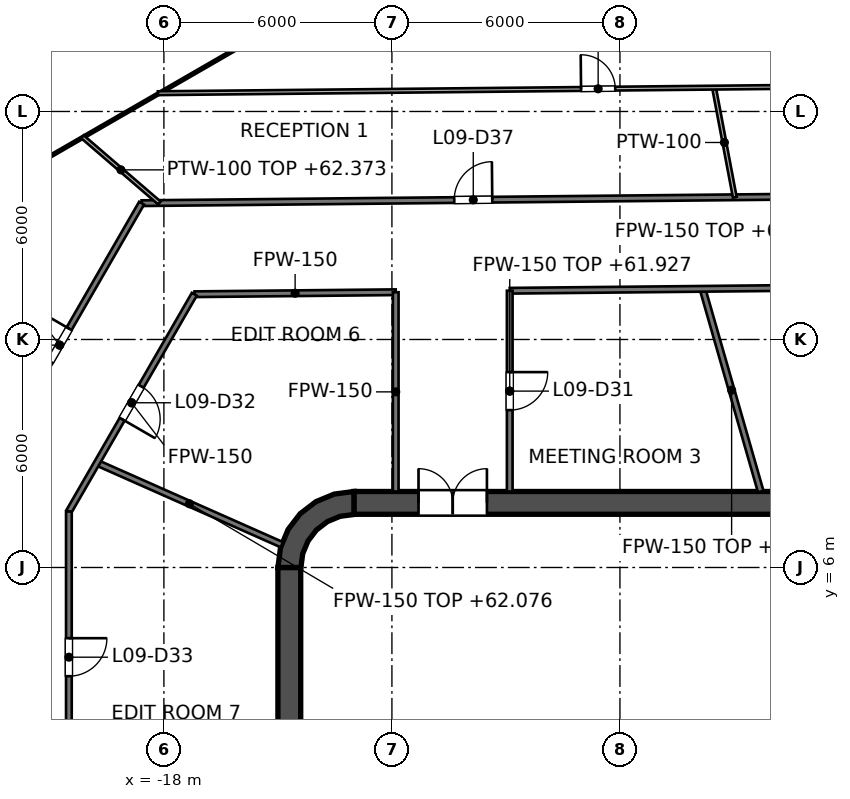
"""IFC4 building model, lengths in metres.
Left out: names, types, materials, properties, quantities, classifications, styles, units other than length and angle.
Written with IfcOpenShell. Run it as: python <this file> out.ifc"""

import sys

from ifc_helpers import new_model, si_unit, direction, frame, frame_2d, origin, place, context, subcontext, project, spatial, polyline, rectangle, outline, extrude, element, fill, save


model = new_model("IFC4")
c1 = context("Model", 3, precision=1e-05, world=origin(), true_north=direction((0.0, 1.0)))
c2 = subcontext(c1, "Body", "Model", "MODEL_VIEW")
j1 = project(units=[si_unit("LENGTHUNIT", "METRE"), si_unit("PLANEANGLEUNIT", "RADIAN")], contexts=[c1])
p1 = place(None, origin())
s1 = spatial("IfcSite", under=j1, at=p1, CompositionType="ELEMENT")
p2 = place(p1, origin())
s2 = spatial("IfcBuilding", under=s1, at=p2, CompositionType="ELEMENT")
p3 = place(p2, frame((0.0, 0.0, 58.8)))
s3 = spatial("IfcBuildingStorey", under=s2, at=p3, CompositionType="ELEMENT", Elevation=58.8)
p4 = place(p3, frame((-13.0, 7.7, 0.0), z_axis=(0.0, 0.0, 1.0), x_axis=(1.0, 0.0, 0.0)))
e1 = element("IfcWall", 1, at=p4, inside=s3, PredefinedType="SHEAR", context=c2, shape_type="SweptSolid", body=[
    extrude(rectangle(XDim=26.0, YDim=0.6, at=frame_2d((13.0, 0.0))), origin(), (0.0, 0.0, 1.0), 4.2),
])
p5 = place(p4, frame((1.7, 0.0, 0.0)))
e2 = element("IfcOpeningElement", 2, at=p5, cuts=e1, PredefinedType="OPENING", context=c2, shape_type="SweptSolid", body=[
    extrude(rectangle(XDim=1.8, YDim=2.1, at=frame_2d((0.9, 1.05))), frame((0.0, 0.3, 0.0), z_axis=(0.0, -1.0, 0.0), x_axis=(1.0, 0.0, 0.0)), (0.0, 0.0, 1.0), 0.6),
])
p6 = place(p4, frame((22.5, 0.0, 0.0)))
e3 = element("IfcOpeningElement", 3, at=p6, cuts=e1, PredefinedType="OPENING", context=c2, shape_type="SweptSolid", body=[
    extrude(rectangle(XDim=1.8, YDim=2.1, at=frame_2d((0.9, 1.05))), frame((0.0, 0.3, 0.0), z_axis=(0.0, -1.0, 0.0), x_axis=(1.0, 0.0, 0.0)), (0.0, 0.0, 1.0), 0.6),
])
p7 = place(p3, frame((-14.7, -6.0, 0.0), z_axis=(0.0, 0.0, 1.0), x_axis=(0.0, 1.0, 0.0)))
e4 = element("IfcWall", 4, at=p7, inside=s3, PredefinedType="SHEAR", context=c2, shape_type="SweptSolid", body=[
    extrude(rectangle(XDim=12.0, YDim=0.6, at=frame_2d((6.0, 0.0))), origin(), (0.0, 0.0, 1.0), 4.2),
])
p8 = place(p3, origin())
e5 = element("IfcWall", 5, at=p8, inside=s3, PredefinedType="SHEAR", context=c2, shape_type="SweptSolid", body=[
    extrude(outline(polyline([(-15.0, 6.0), (-14.395, 6.0), (-14.347, 6.361), (-14.208, 6.698), (-13.986, 6.986), (-13.698, 7.208), (-13.361, 7.347), (-13.0, 7.395), (-13.0, 8.0), (-13.518, 7.932), (-14.0, 7.732), (-14.414, 7.414), (-14.732, 7.0), (-14.932, 6.518), (-15.0, 6.0)])), origin(), (0.0, 0.0, 1.0), 4.2),
])
p9 = place(p3, frame((-9.0, 4.1, 0.0), z_axis=(0.0, 0.0, 1.0), x_axis=(0.0, 1.0, 0.0)))
e6 = element("IfcWall", 6, at=p9, inside=s3, PredefinedType="SOLIDWALL", context=c2, shape_type="SweptSolid", body=[
    extrude(rectangle(XDim=2.5, YDim=0.25, at=frame_2d((1.25, 0.0))), origin(), (0.0, 0.0, 1.0), 4.05),
])
p10 = place(p9, frame((0.65, 0.0, 0.0)))
e7 = element("IfcOpeningElement", 7, at=p10, cuts=e6, PredefinedType="OPENING", context=c2, shape_type="SweptSolid", body=[
    extrude(rectangle(XDim=1.2, YDim=2.1, at=frame_2d((0.6, 1.05))), frame((0.0, 0.125, 0.0), z_axis=(0.0, -1.0, 0.0), x_axis=(1.0, 0.0, 0.0)), (0.0, 0.0, 1.0), 0.25),
])
p11 = place(p3, frame((-3.15, 4.1, 0.0), z_axis=(0.0, 0.0, 1.0), x_axis=(0.0, 1.0, 0.0)))
e8 = element("IfcWall", 8, at=p11, inside=s3, PredefinedType="SOLIDWALL", context=c2, shape_type="SweptSolid", body=[
    extrude(rectangle(XDim=2.5, YDim=0.25, at=frame_2d((1.25, 0.0))), origin(), (0.0, 0.0, 1.0), 4.05),
])
p12 = place(p3, frame((-9.125, 7.0, 0.0), z_axis=(0.0, 0.0, 1.0), x_axis=(1.0, 0.0, 0.0)))
e9 = element("IfcWall", 9, at=p12, inside=s3, PredefinedType="SOLIDWALL", context=c2, shape_type="SweptSolid", body=[
    extrude(rectangle(XDim=18.25, YDim=0.8, at=frame_2d((9.125, 0.0))), origin(), (0.0, 0.0, 1.0), 4.05),
])
p13 = place(p3, frame((-9.125, 3.975, 0.0), z_axis=(0.0, 0.0, 1.0), x_axis=(1.0, 0.0, 0.0)))
e10 = element("IfcWall", 10, at=p13, inside=s3, PredefinedType="SOLIDWALL", context=c2, shape_type="SweptSolid", body=[
    extrude(rectangle(XDim=8.35, YDim=0.25, at=frame_2d((4.175, 0.0))), origin(), (0.0, 0.0, 1.0), 4.05),
])
p14 = place(p3, frame((-9.0, 1.65, 0.0), z_axis=(0.0, 0.0, 1.0), x_axis=(0.0, 1.0, 0.0)))
e11 = element("IfcWall", 11, at=p14, inside=s3, PredefinedType="PARTITIONING", context=c2, shape_type="SweptSolid", body=[
    extrude(rectangle(XDim=2.2, YDim=0.25, at=frame_2d((1.1, 0.0))), origin(), (0.0, 0.0, 1.0), 4.05),
])
for number, where, z_axis, x_axis in (
    (12, (-7.0, 1.65, 0.0), (0.0, 0.0, 1.0), (0.0, 1.0, 0.0)),
    (13, (-2.8, 1.65, 0.0), (0.0, 0.0, 1.0), (0.0, 1.0, 0.0)),
):
    element("IfcWall", number, at=place(p3, frame(where, z_axis=z_axis, x_axis=x_axis)), inside=s3, PredefinedType="PARTITIONING", context=c2, shape_type="SweptSolid", body=[
        extrude(rectangle(XDim=2.2, YDim=0.1, at=frame_2d((1.1, 0.0))), origin(), (0.0, 0.0, 1.0), 4.05),
    ])
p15 = place(p3, frame((-11.8, -7.4, 0.0), z_axis=(0.0, 0.0, 1.0), x_axis=(0.0, 1.0, 0.0)))
e14 = element("IfcWall", 14, at=p15, inside=s3, PredefinedType="SOLIDWALL", context=c2, shape_type="SweptSolid", body=[
    extrude(rectangle(XDim=14.8, YDim=0.4, at=frame_2d((7.4, 0.0))), origin(), (0.0, 0.0, 1.0), 4.05),
])
p16 = place(p15, frame((11.2, 0.0, 0.0)))
e15 = element("IfcOpeningElement", 15, at=p16, cuts=e14, PredefinedType="OPENING", context=c2, shape_type="SweptSolid", body=[
    extrude(rectangle(XDim=1.1, YDim=2.1, at=frame_2d((0.55, 1.05))), frame((0.0, 0.2, 0.0), z_axis=(0.0, -1.0, 0.0), x_axis=(1.0, 0.0, 0.0)), (0.0, 0.0, 1.0), 0.4),
])
p17 = place(p15, frame((8.3, 0.0, 0.0)))
e16 = element("IfcOpeningElement", 16, at=p17, cuts=e14, PredefinedType="OPENING", context=c2, shape_type="SweptSolid", body=[
    extrude(rectangle(XDim=1.1, YDim=2.1, at=frame_2d((0.55, 1.05))), frame((0.0, 0.2, 0.0), z_axis=(0.0, -1.0, 0.0), x_axis=(1.0, 0.0, 0.0)), (0.0, 0.0, 1.0), 0.4),
])
p18 = place(p15, frame((5.4, 0.0, 0.0)))
e17 = element("IfcOpeningElement", 17, at=p18, cuts=e14, PredefinedType="OPENING", context=c2, shape_type="SweptSolid", body=[
    extrude(rectangle(XDim=1.1, YDim=2.1, at=frame_2d((0.55, 1.05))), frame((0.0, 0.2, 0.0), z_axis=(0.0, -1.0, 0.0), x_axis=(1.0, 0.0, 0.0)), (0.0, 0.0, 1.0), 0.4),
])
p19 = place(p15, frame((13.552, 0.0, 0.0)))
e18 = element("IfcOpeningElement", 18, at=p19, cuts=e14, PredefinedType="OPENING", context=c2, shape_type="SweptSolid", body=[
    extrude(rectangle(XDim=0.9, YDim=2.1, at=frame_2d((0.45, 1.05))), frame((0.0, 0.2, 0.0), z_axis=(0.0, -1.0, 0.0), x_axis=(1.0, 0.0, 0.0)), (0.0, 0.0, 1.0), 0.4),
])
p20 = place(p15, frame((0.347, 0.0, 0.0)))
e19 = element("IfcOpeningElement", 19, at=p20, cuts=e14, PredefinedType="OPENING", context=c2, shape_type="SweptSolid", body=[
    extrude(rectangle(XDim=0.9, YDim=2.1, at=frame_2d((0.45, 1.05))), frame((0.0, 0.2, 0.0), z_axis=(0.0, -1.0, 0.0), x_axis=(1.0, 0.0, 0.0)), (0.0, 0.0, 1.0), 0.4),
])
e20 = element("IfcWall", 20, at=p8, inside=s3, PredefinedType="SOLIDWALL", context=c2, shape_type="SweptSolid", body=[
    extrude(outline(polyline([(-12.0, -5.925), (-12.0, -5.675), (-14.15, -5.675), (-14.15, -3.025), (-12.0, -3.025), (-12.0, -2.775), (-14.15, -2.775), (-14.15, -0.125), (-12.0, -0.125), (-12.0, 0.125), (-14.15, 0.125), (-14.15, 2.775), (-12.0, 2.775), (-12.0, 3.025), (-14.15, 3.025), (-14.15, 5.675), (-12.0, 5.675), (-12.0, 5.925), (-14.15, 5.925), (-14.4, 5.925), (-14.4, 5.675), (-14.4, 3.025), (-14.4, 2.775), (-14.4, 0.125), (-14.4, -0.125), (-14.4, -2.775), (-14.4, -3.025), (-14.4, -5.675), (-14.4, -5.925), (-14.15, -5.925), (-12.0, -5.925)])), origin(), (0.0, 0.0, 1.0), 4.05),
])
p21 = place(p3, frame((-3.827, 13.333, 0.0), z_axis=(0.0, 0.0, 1.0), x_axis=(0.275935525478, -0.961176147113, 0.0)))
e21 = element("IfcWall", 21, at=p21, inside=s3, PredefinedType="PARTITIONING", context=c2, shape_type="SweptSolid", body=[
    extrude(rectangle(XDim=5.548, YDim=0.15, at=frame_2d((2.774, 0.0))), origin(), (0.0, 0.0, 1.0), 4.05),
])
p22 = place(p3, frame((-19.76, 8.755, 0.0), z_axis=(0.0, 0.0, 1.0), x_axis=(0.91424834547, -0.405154245695, 0.0)))
e22 = element("IfcWall", 22, at=p22, inside=s3, PredefinedType="PARTITIONING", context=c2, shape_type="SweptSolid", body=[
    extrude(rectangle(XDim=5.318, YDim=0.15, at=frame_2d((2.659, 0.0))), origin(), (0.0, 0.0, 1.0), 3.276),
])
p23 = place(p3, frame((-17.194, 13.191, 0.0), z_axis=(0.0, 0.0, 1.0), x_axis=(0.999950394899, 0.009960308291, 0.0)))
e23 = element("IfcWall", 23, at=p23, inside=s3, PredefinedType="PARTITIONING", context=c2, shape_type="SweptSolid", body=[
    extrude(rectangle(XDim=5.294, YDim=0.15, at=frame_2d((2.647, 0.0))), origin(), (0.0, 0.0, 1.0), 3.195),
])
p24 = place(p3, frame((-8.9, 13.282, 0.0), z_axis=(0.0, 0.0, 1.0), x_axis=(0.999950697987, 0.009929833562, 0.0)))
e24 = element("IfcWall", 24, at=p24, inside=s3, PredefinedType="PARTITIONING", context=c2, shape_type="SweptSolid", body=[
    extrude(rectangle(XDim=17.801, YDim=0.15, at=frame_2d((8.9, 0.0))), origin(), (0.0, 0.0, 1.0), 3.127),
])
p25 = place(p24, frame((8.412, 0.0, 0.0)))
e25 = element("IfcOpeningElement", 25, at=p25, cuts=e24, PredefinedType="OPENING", context=c2, shape_type="SweptSolid", body=[
    extrude(rectangle(XDim=1.0, YDim=2.1, at=frame_2d((0.5, 1.05))), frame((0.0, 0.075, 0.0), z_axis=(0.0, -1.0, 0.0), x_axis=(1.0, 0.0, 0.0)), (0.0, 0.0, 1.0), 0.15),
])
p26 = place(p3, frame((-18.587, 15.587, 0.0), z_axis=(0.0, 0.0, 1.0), x_axis=(0.99995065417, 0.009934245078, 0.0)))
e26 = element("IfcWall", 26, at=p26, inside=s3, PredefinedType="PARTITIONING", context=c2, shape_type="SweptSolid", body=[
    extrude(rectangle(XDim=33.669, YDim=0.15, at=frame_2d((16.834, 0.0))), origin(), (0.0, 0.0, 1.0), 3.127),
])
p27 = place(p26, frame((18.716, 0.0, 0.0)))
e27 = element("IfcOpeningElement", 27, at=p27, cuts=e26, PredefinedType="OPENING", context=c2, shape_type="SweptSolid", body=[
    extrude(rectangle(XDim=1.0, YDim=2.1, at=frame_2d((0.5, 1.05))), frame((0.0, 0.075, 0.0), z_axis=(0.0, -1.0, 0.0), x_axis=(1.0, 0.0, 0.0)), (0.0, 0.0, 1.0), 0.15),
])
p28 = place(p26, frame((8.228, 0.0, 0.0)))
e28 = element("IfcOpeningElement", 28, at=p28, cuts=e26, PredefinedType="OPENING", context=c2, shape_type="SweptSolid", body=[
    extrude(rectangle(XDim=1.0, YDim=2.1, at=frame_2d((0.5, 1.05))), frame((0.0, 0.075, 0.0), z_axis=(0.0, -1.0, 0.0), x_axis=(1.0, 0.0, 0.0)), (0.0, 0.0, 1.0), 0.15),
])
p29 = place(p26, frame((29.768, 0.0, 0.0)))
e29 = element("IfcOpeningElement", 29, at=p29, cuts=e26, PredefinedType="OPENING", context=c2, shape_type="SweptSolid", body=[
    extrude(rectangle(XDim=1.0, YDim=2.1, at=frame_2d((0.5, 1.05))), frame((0.0, 0.075, 0.0), z_axis=(0.0, -1.0, 0.0), x_axis=(1.0, 0.0, 0.0)), (0.0, 0.0, 1.0), 0.15),
])
p30 = place(p26, frame((24.449, 0.0, 0.0)))
e30 = element("IfcOpeningElement", 30, at=p30, cuts=e26, PredefinedType="OPENING", context=c2, shape_type="SweptSolid", body=[
    extrude(rectangle(XDim=1.0, YDim=2.1, at=frame_2d((0.5, 1.05))), frame((0.0, 0.075, 0.0), z_axis=(0.0, -1.0, 0.0), x_axis=(1.0, 0.0, 0.0)), (0.0, 0.0, 1.0), 0.15),
])
p31 = place(p3, frame((-20.5, 7.474, 0.0), z_axis=(0.0, 0.0, 1.0), x_axis=(0.500012665616, 0.866018091164, 0.0)))
e31 = element("IfcWall", 31, at=p31, inside=s3, PredefinedType="PARTITIONING", context=c2, shape_type="SweptSolid", body=[
    extrude(rectangle(XDim=6.602, YDim=0.15, at=frame_2d((3.301, 0.0))), origin(), (0.0, 0.0, 1.0), 3.195),
])
p32 = place(p31, frame((2.803, 0.0, 0.0)))
e32 = element("IfcOpeningElement", 32, at=p32, cuts=e31, PredefinedType="OPENING", context=c2, shape_type="SweptSolid", body=[
    extrude(rectangle(XDim=1.0, YDim=2.1, at=frame_2d((0.5, 1.05))), frame((0.0, 0.075, 0.0), z_axis=(0.0, -1.0, 0.0), x_axis=(1.0, 0.0, 0.0)), (0.0, 0.0, 1.0), 0.15),
])
p33 = place(p3, frame((-22.9, 8.117, 0.0), z_axis=(0.0, 0.0, 1.0), x_axis=(0.500017275495, 0.866015429543, 0.0)))
e33 = element("IfcWall", 33, at=p33, inside=s3, PredefinedType="PARTITIONING", context=c2, shape_type="SweptSolid", body=[
    extrude(rectangle(XDim=8.626, YDim=0.15, at=frame_2d((4.313, 0.0))), origin(), (0.0, 0.0, 1.0), 3.195),
])
p34 = place(p33, frame((3.813, 0.0, 0.0)))
e34 = element("IfcOpeningElement", 34, at=p34, cuts=e33, PredefinedType="OPENING", context=c2, shape_type="SweptSolid", body=[
    extrude(rectangle(XDim=1.0, YDim=2.1, at=frame_2d((0.5, 1.05))), frame((0.0, 0.075, 0.0), z_axis=(0.0, -1.0, 0.0), x_axis=(1.0, 0.0, 0.0)), (0.0, 0.0, 1.0), 0.15),
])
p35 = place(p3, frame((-8.9, 8.0, 0.0), z_axis=(0.0, 0.0, 1.0), x_axis=(0.0, 1.0, 0.0)))
e35 = element("IfcWall", 35, at=p35, inside=s3, PredefinedType="PARTITIONING", context=c2, shape_type="SweptSolid", body=[
    extrude(rectangle(XDim=5.283, YDim=0.15, at=frame_2d((2.642, 0.0))), origin(), (0.0, 0.0, 1.0), 3.127),
])
p36 = place(p35, frame((2.142, 0.0, 0.0)))
e36 = element("IfcOpeningElement", 36, at=p36, cuts=e35, PredefinedType="OPENING", context=c2, shape_type="SweptSolid", body=[
    extrude(rectangle(XDim=1.0, YDim=2.1, at=frame_2d((0.5, 1.05))), frame((0.0, 0.075, 0.0), z_axis=(0.0, -1.0, 0.0), x_axis=(1.0, 0.0, 0.0)), (0.0, 0.0, 1.0), 0.15),
])
p37 = place(p3, frame((-11.9, 8.0, 0.0), z_axis=(0.0, 0.0, 1.0), x_axis=(0.0, 1.0, 0.0)))
e37 = element("IfcWall", 37, at=p37, inside=s3, PredefinedType="PARTITIONING", context=c2, shape_type="SweptSolid", body=[
    extrude(rectangle(XDim=5.243, YDim=0.15, at=frame_2d((2.622, 0.0))), origin(), (0.0, 0.0, 1.0), 3.195),
])
p38 = place(p3, frame((-20.5, -7.095, 0.0), z_axis=(0.0, 0.0, 1.0), x_axis=(0.0, 1.0, 0.0)))
e38 = element("IfcWall", 38, at=p38, inside=s3, PredefinedType="PARTITIONING", context=c2, shape_type="SweptSolid", body=[
    extrude(rectangle(XDim=14.569, YDim=0.15, at=frame_2d((7.285, 0.0))), origin(), (0.0, 0.0, 1.0), 3.127),
])
p39 = place(p38, frame((10.234, 0.0, 0.0)))
e39 = element("IfcOpeningElement", 39, at=p39, cuts=e38, PredefinedType="OPENING", context=c2, shape_type="SweptSolid", body=[
    extrude(rectangle(XDim=1.0, YDim=2.1, at=frame_2d((0.5, 1.05))), frame((0.0, 0.075, 0.0), z_axis=(0.0, -1.0, 0.0), x_axis=(1.0, 0.0, 0.0)), (0.0, 0.0, 1.0), 0.15),
])
p40 = place(p38, frame((3.0, 0.0, 0.0)))
e40 = element("IfcOpeningElement", 40, at=p40, cuts=e38, PredefinedType="OPENING", context=c2, shape_type="SweptSolid", body=[
    extrude(rectangle(XDim=1.0, YDim=2.1, at=frame_2d((0.5, 1.05))), frame((0.0, 0.075, 0.0), z_axis=(0.0, -1.0, 0.0), x_axis=(1.0, 0.0, 0.0)), (0.0, 0.0, 1.0), 0.15),
])
p41 = place(p3, frame((-3.524, 18.626, 0.0), z_axis=(0.0, 0.0, 1.0), x_axis=(0.185980649988, -0.982553407113, 0.0)))
e41 = element("IfcWall", 41, at=p41, inside=s3, PredefinedType="PARTITIONING", context=c2, shape_type="SweptSolid", body=[
    extrude(rectangle(XDim=2.935, YDim=0.1, at=frame_2d((1.468, 0.0))), origin(), (0.0, 0.0, 1.0), 4.05),
])
p42 = place(p3, frame((-20.143, 17.335, 0.0), z_axis=(0.0, 0.0, 1.0), x_axis=(0.757945732802, -0.652317611389, 0.0)))
e42 = element("IfcWall", 42, at=p42, inside=s3, PredefinedType="PARTITIONING", context=c2, shape_type="SweptSolid", body=[
    extrude(rectangle(XDim=2.672, YDim=0.1, at=frame_2d((1.336, 0.0))), origin(), (0.0, 0.0, 1.0), 3.573),
])
p43 = place(p3, frame((-18.158, 18.481, 0.0), z_axis=(0.0, 0.0, 1.0), x_axis=(0.999950046819, 0.009995192196, 0.0)))
e43 = element("IfcWall", 43, at=p43, inside=s3, PredefinedType="PARTITIONING", context=c2, shape_type="SweptSolid", body=[
    extrude(rectangle(XDim=34.001, YDim=0.1, at=frame_2d((17.0, 0.0))), origin(), (0.0, 0.0, 1.0), 3.127),
])
p44 = place(p43, frame((11.135, 0.0, 0.0)))
e44 = element("IfcOpeningElement", 44, at=p44, cuts=e43, PredefinedType="OPENING", context=c2, shape_type="SweptSolid", body=[
    extrude(rectangle(XDim=0.9, YDim=2.1, at=frame_2d((0.45, 1.05))), frame((0.0, 0.05, 0.0), z_axis=(0.0, -1.0, 0.0), x_axis=(1.0, 0.0, 0.0)), (0.0, 0.0, 1.0), 0.1),
])
p45 = place(p43, frame((28.875, 0.0, 0.0)))
e45 = element("IfcOpeningElement", 45, at=p45, cuts=e43, PredefinedType="OPENING", context=c2, shape_type="SweptSolid", body=[
    extrude(rectangle(XDim=0.9, YDim=2.1, at=frame_2d((0.45, 1.05))), frame((0.0, 0.05, 0.0), z_axis=(0.0, -1.0, 0.0), x_axis=(1.0, 0.0, 0.0)), (0.0, 0.0, 1.0), 0.1),
])
p46 = place(p16, origin())
e46 = element("IfcDoor", 46, at=p46, inside=s3, OperationType="DOUBLE_DOOR_SLIDING", PredefinedType="DOOR", context=c2, shape_type="SweptSolid", body=[
    extrude(rectangle(XDim=1.1, YDim=2.1, at=frame_2d((0.55, 1.05))), frame((0.0, 0.025, 0.0), z_axis=(0.0, -1.0, 0.0), x_axis=(1.0, 0.0, 0.0)), (0.0, 0.0, 1.0), 0.05),
])
fill(e15, e46)
p47 = place(p10, origin())
e47 = element("IfcDoor", 47, at=p47, inside=s3, OperationType="SINGLE_SWING_RIGHT", PredefinedType="DOOR", context=c2, shape_type="SweptSolid", body=[
    extrude(rectangle(XDim=1.2, YDim=2.1, at=frame_2d((0.6, 1.05))), frame((0.0, 0.025, 0.0), z_axis=(0.0, -1.0, 0.0), x_axis=(1.0, 0.0, 0.0)), (0.0, 0.0, 1.0), 0.05),
])
fill(e7, e47)
p48 = place(p19, origin())
e48 = element("IfcDoor", 48, at=p48, inside=s3, OperationType="SINGLE_SWING_LEFT", PredefinedType="DOOR", context=c2, shape_type="SweptSolid", body=[
    extrude(rectangle(XDim=0.9, YDim=2.1, at=frame_2d((0.45, 1.05))), frame((0.0, 0.025, 0.0), z_axis=(0.0, -1.0, 0.0), x_axis=(1.0, 0.0, 0.0)), (0.0, 0.0, 1.0), 0.05),
])
fill(e18, e48)
p49 = place(p5, origin())
e49 = element("IfcDoor", 49, at=p49, inside=s3, OperationType="DOUBLE_DOOR_SINGLE_SWING", PredefinedType="DOOR", context=c2, shape_type="SweptSolid", body=[
    extrude(rectangle(XDim=1.8, YDim=2.1, at=frame_2d((0.9, 1.05))), frame((0.0, 0.025, 0.0), z_axis=(0.0, -1.0, 0.0), x_axis=(1.0, 0.0, 0.0)), (0.0, 0.0, 1.0), 0.05),
])
fill(e2, e49)
p50 = place(p36, origin())
e50 = element("IfcDoor", 50, at=p50, inside=s3, OperationType="SINGLE_SWING_RIGHT", PredefinedType="DOOR", context=c2, shape_type="SweptSolid", body=[
    extrude(rectangle(XDim=1.0, YDim=2.1, at=frame_2d((0.5, 1.05))), frame((0.0, 0.025, 0.0), z_axis=(0.0, -1.0, 0.0), x_axis=(1.0, 0.0, 0.0)), (0.0, 0.0, 1.0), 0.05),
])
fill(e36, e50)
p51 = place(p32, origin())
e51 = element("IfcDoor", 51, at=p51, inside=s3, OperationType="SINGLE_SWING_LEFT", PredefinedType="DOOR", context=c2, shape_type="SweptSolid", body=[
    extrude(rectangle(XDim=1.0, YDim=2.1, at=frame_2d((0.5, 1.05))), frame((0.0, 0.025, 0.0), z_axis=(0.0, -1.0, 0.0), x_axis=(1.0, 0.0, 0.0)), (0.0, 0.0, 1.0), 0.05),
])
fill(e32, e51)
p52 = place(p39, origin())
e52 = element("IfcDoor", 52, at=p52, inside=s3, OperationType="SINGLE_SWING_RIGHT", PredefinedType="DOOR", context=c2, shape_type="SweptSolid", body=[
    extrude(rectangle(XDim=1.0, YDim=2.1, at=frame_2d((0.5, 1.05))), frame((0.0, 0.025, 0.0), z_axis=(0.0, -1.0, 0.0), x_axis=(1.0, 0.0, 0.0)), (0.0, 0.0, 1.0), 0.05),
])
fill(e39, e52)
p53 = place(p28, origin())
e53 = element("IfcDoor", 53, at=p53, inside=s3, OperationType="SINGLE_SWING_RIGHT", PredefinedType="DOOR", context=c2, shape_type="SweptSolid", body=[
    extrude(rectangle(XDim=1.0, YDim=2.1, at=frame_2d((0.5, 1.05))), frame((0.0, 0.025, 0.0), z_axis=(0.0, -1.0, 0.0), x_axis=(1.0, 0.0, 0.0)), (0.0, 0.0, 1.0), 0.05),
])
fill(e28, e53)
p54 = place(p34, origin())
e54 = element("IfcDoor", 54, at=p54, inside=s3, OperationType="SINGLE_SWING_RIGHT", PredefinedType="DOOR", context=c2, shape_type="SweptSolid", body=[
    extrude(rectangle(XDim=1.0, YDim=2.1, at=frame_2d((0.5, 1.05))), frame((0.0, 0.025, 0.0), z_axis=(0.0, -1.0, 0.0), x_axis=(1.0, 0.0, 0.0)), (0.0, 0.0, 1.0), 0.05),
])
fill(e34, e54)
p55 = place(p44, origin())
e55 = element("IfcDoor", 55, at=p55, inside=s3, OperationType="SINGLE_SWING_LEFT", PredefinedType="DOOR", context=c2, shape_type="SweptSolid", body=[
    extrude(rectangle(XDim=0.9, YDim=2.1, at=frame_2d((0.45, 1.05))), frame((0.0, 0.025, 0.0), z_axis=(0.0, -1.0, 0.0), x_axis=(1.0, 0.0, 0.0)), (0.0, 0.0, 1.0), 0.05),
])
fill(e44, e55)
save(model, sys.argv[1])
